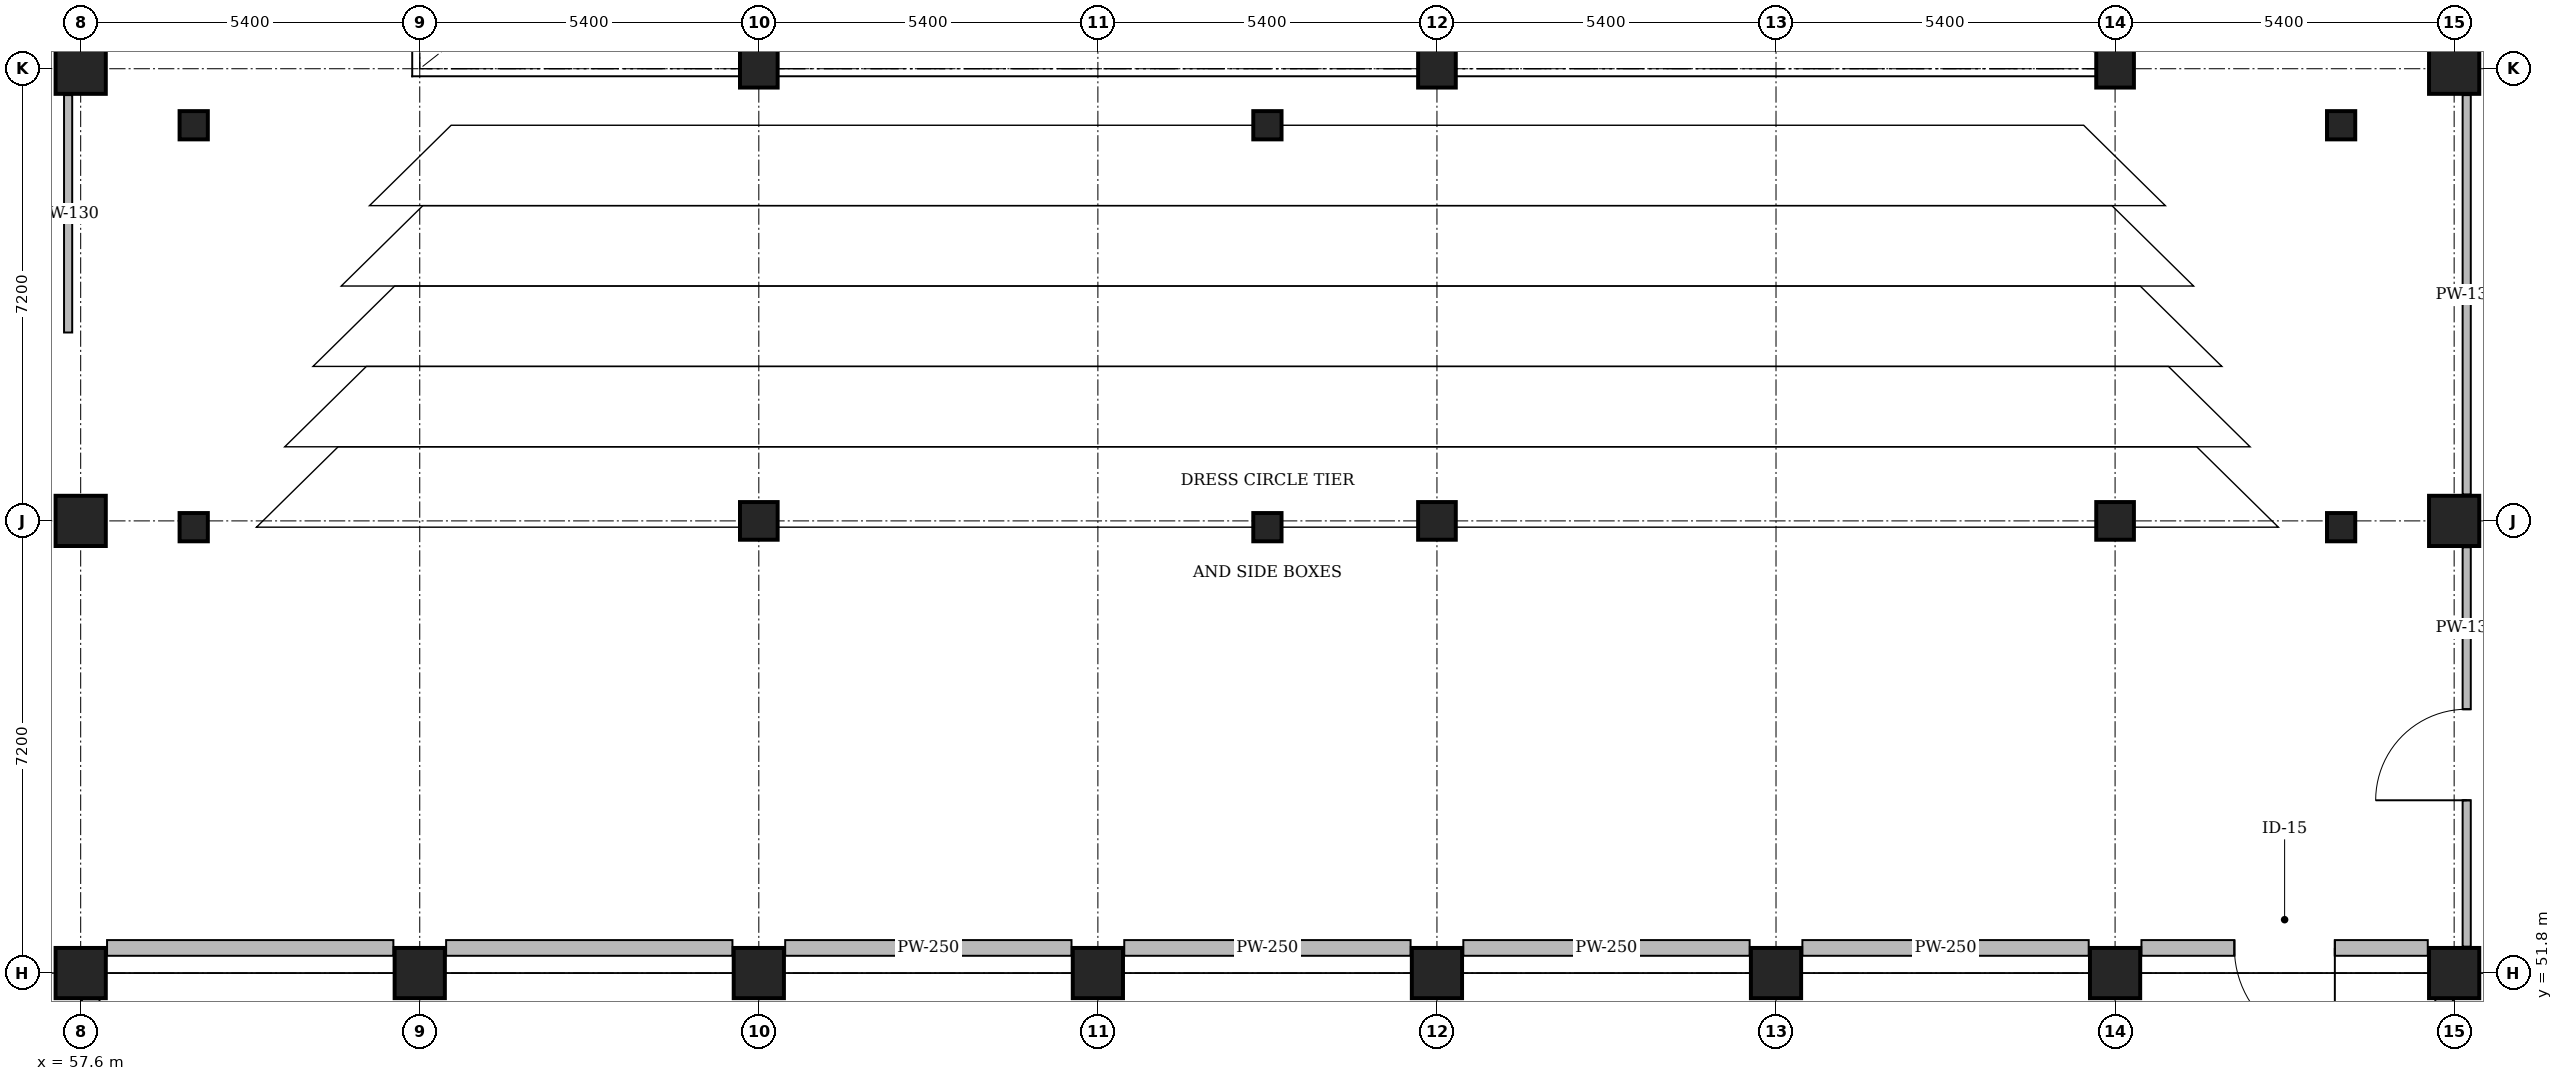
"""IFC4 building model, lengths in metres.
Left out: names, types, materials, properties, quantities, classifications, styles, units other than length and angle.
Written with IfcOpenShell. Run it as: python <this file> out.ifc"""

import sys

from ifc_helpers import new_model, si_unit, direction, frame, frame_2d, origin, origin_2d, place, context, subcontext, project, spatial, rectangle, extrude, element, fill, save


model = new_model("IFC4")
c1 = context("Model", 3, precision=1e-05, world=origin(), true_north=direction((0.0, 1.0)))
c2 = subcontext(c1, "Body", "Model", "MODEL_VIEW")
j1 = project(units=[si_unit("LENGTHUNIT", "METRE"), si_unit("PLANEANGLEUNIT", "RADIAN")], contexts=[c1])
p1 = place(None, origin())
s1 = spatial("IfcSite", under=j1, at=p1, CompositionType="ELEMENT")
p2 = place(p1, origin())
s2 = spatial("IfcBuilding", under=s1, at=p2, CompositionType="ELEMENT")
p3 = place(p2, frame((0.0, 0.0, 4.8)))
s3 = spatial("IfcBuildingStorey", under=s2, at=p3, CompositionType="ELEMENT", Elevation=4.8)
p4 = place(p3, frame((68.4, 51.8, 0.0), z_axis=(0.0, 0.0, 1.0), x_axis=(1.0, 0.0, 0.0)))
e1 = element("IfcColumn", 1, at=p4, inside=s3, PredefinedType="COLUMN", context=c2, shape_type="SweptSolid", body=[
    extrude(rectangle(XDim=0.8, YDim=0.8, at=origin_2d()), origin(), (0.0, 0.0, 1.0), 4.2),
])
for number, where, z_axis, x_axis in (
    (2, (68.4, 59.0, 0.0), (0.0, 0.0, 1.0), (1.0, 0.0, 0.0)),
    (3, (68.4, 66.2, 0.0), (0.0, 0.0, 1.0), (1.0, 0.0, 0.0)),
):
    element("IfcColumn", number, at=place(p3, frame(where, z_axis=z_axis, x_axis=x_axis)), inside=s3, PredefinedType="COLUMN", context=c2, shape_type="SweptSolid", body=[
        extrude(rectangle(XDim=0.6, YDim=0.6, at=origin_2d()), origin(), (0.0, 0.0, 1.0), 4.2),
    ])
for number, where, z_axis, x_axis in (
    (4, (73.8, 51.8, 0.0), (0.0, 0.0, 1.0), (1.0, 0.0, 0.0)),
    (5, (79.2, 51.8, 0.0), (0.0, 0.0, 1.0), (1.0, 0.0, 0.0)),
):
    element("IfcColumn", number, at=place(p3, frame(where, z_axis=z_axis, x_axis=x_axis)), inside=s3, PredefinedType="COLUMN", context=c2, shape_type="SweptSolid", body=[
        extrude(rectangle(XDim=0.8, YDim=0.8, at=origin_2d()), origin(), (0.0, 0.0, 1.0), 4.2),
    ])
for number, where, z_axis, x_axis in (
    (6, (79.2, 59.0, 0.0), (0.0, 0.0, 1.0), (1.0, 0.0, 0.0)),
    (7, (79.2, 66.2, 0.0), (0.0, 0.0, 1.0), (1.0, 0.0, 0.0)),
):
    element("IfcColumn", number, at=place(p3, frame(where, z_axis=z_axis, x_axis=x_axis)), inside=s3, PredefinedType="COLUMN", context=c2, shape_type="SweptSolid", body=[
        extrude(rectangle(XDim=0.6, YDim=0.6, at=origin_2d()), origin(), (0.0, 0.0, 1.0), 4.2),
    ])
for number, where, z_axis, x_axis in (
    (8, (84.6, 51.8, 0.0), (0.0, 0.0, 1.0), (1.0, 0.0, 0.0)),
    (9, (90.0, 51.8, 0.0), (0.0, 0.0, 1.0), (1.0, 0.0, 0.0)),
):
    element("IfcColumn", number, at=place(p3, frame(where, z_axis=z_axis, x_axis=x_axis)), inside=s3, PredefinedType="COLUMN", context=c2, shape_type="SweptSolid", body=[
        extrude(rectangle(XDim=0.8, YDim=0.8, at=origin_2d()), origin(), (0.0, 0.0, 1.0), 4.2),
    ])
for number, where, z_axis, x_axis in (
    (10, (90.0, 59.0, 0.0), (0.0, 0.0, 1.0), (1.0, 0.0, 0.0)),
    (11, (90.0, 66.2, 0.0), (0.0, 0.0, 1.0), (1.0, 0.0, 0.0)),
):
    element("IfcColumn", number, at=place(p3, frame(where, z_axis=z_axis, x_axis=x_axis)), inside=s3, PredefinedType="COLUMN", context=c2, shape_type="SweptSolid", body=[
        extrude(rectangle(XDim=0.6, YDim=0.6, at=origin_2d()), origin(), (0.0, 0.0, 1.0), 4.2),
    ])
for number, where, z_axis, x_axis in (
    (12, (95.4, 51.8, 0.0), (0.0, 0.0, 1.0), (1.0, 0.0, 0.0)),
    (13, (95.4, 59.0, 0.0), (0.0, 0.0, 1.0), (1.0, 0.0, 0.0)),
    (14, (95.4, 66.2, 0.0), (0.0, 0.0, 1.0), (1.0, 0.0, 0.0)),
    (15, (57.6, 51.8, 0.0), (0.0, 0.0, 1.0), (1.0, 0.0, 0.0)),
    (16, (57.6, 59.0, 0.0), (0.0, 0.0, 1.0), (1.0, 0.0, 0.0)),
    (17, (57.6, 66.2, 0.0), (0.0, 0.0, 1.0), (1.0, 0.0, 0.0)),
    (18, (63.0, 51.8, 0.0), (0.0, 0.0, 1.0), (1.0, 0.0, 0.0)),
):
    element("IfcColumn", number, at=place(p3, frame(where, z_axis=z_axis, x_axis=x_axis)), inside=s3, PredefinedType="COLUMN", context=c2, shape_type="SweptSolid", body=[
        extrude(rectangle(XDim=0.8, YDim=0.8, at=origin_2d()), origin(), (0.0, 0.0, 1.0), 4.2),
    ])
for number, where, z_axis, x_axis in (
    (19, (59.4, 58.9, 0.0), (0.0, 0.0, 1.0), (1.0, 0.0, 0.0)),
    (20, (76.5, 58.9, 0.0), (0.0, 0.0, 1.0), (1.0, 0.0, 0.0)),
    (21, (93.6, 58.9, 0.0), (0.0, 0.0, 1.0), (1.0, 0.0, 0.0)),
    (22, (59.4, 65.3, 0.0), (0.0, 0.0, 1.0), (1.0, 0.0, 0.0)),
    (23, (76.5, 65.3, 0.0), (0.0, 0.0, 1.0), (1.0, 0.0, 0.0)),
    (24, (93.6, 65.3, 0.0), (0.0, 0.0, 1.0), (1.0, 0.0, 0.0)),
):
    element("IfcColumn", number, at=place(p3, frame(where, z_axis=z_axis, x_axis=x_axis)), inside=s3, PredefinedType="COLUMN", context=c2, shape_type="SweptSolid", body=[
        extrude(rectangle(XDim=0.45, YDim=0.45, at=origin_2d()), origin(), (0.0, 0.0, 1.0), 4.2),
    ])
p5 = place(p3, frame((57.76, 49.9, 0.0), z_axis=(0.0, 0.0, 1.0), x_axis=(0.0, 1.0, 0.0)))
e25 = element("IfcWall", 25, at=p5, inside=s3, PredefinedType="SOLIDWALL", context=c2, shape_type="SweptSolid", body=[
    extrude(rectangle(XDim=1.95, YDim=0.28, at=frame_2d((0.975, 0.0))), origin(), (0.0, 0.0, 1.0), 2.723),
])
p6 = place(p3, frame((95.24, 49.9, 0.0), z_axis=(0.0, 0.0, 1.0), x_axis=(0.0, 1.0, 0.0)))
e26 = element("IfcWall", 26, at=p6, inside=s3, PredefinedType="SOLIDWALL", context=c2, shape_type="SweptSolid", body=[
    extrude(rectangle(XDim=1.95, YDim=0.28, at=frame_2d((0.975, 0.0))), origin(), (0.0, 0.0, 1.0), 3.373),
])
p7 = place(p3, frame((94.98, 52.2, 0.0), z_axis=(0.0, 0.0, 1.0), x_axis=(-1.0, 0.0, 0.0)))
e27 = element("IfcWall", 27, at=p7, inside=s3, PredefinedType="PARTITIONING", context=c2, shape_type="SweptSolid", body=[
    extrude(rectangle(XDim=4.56, YDim=0.25, at=frame_2d((2.28, 0.0))), origin(), (0.0, 0.0, 1.0), 3.26),
])
p8 = place(p7, frame((1.48, 0.0, 0.0)))
e28 = element("IfcOpeningElement", 28, at=p8, cuts=e27, PredefinedType="OPENING", context=c2, shape_type="SweptSolid", body=[
    extrude(rectangle(XDim=1.6, YDim=2.25, at=frame_2d((0.8, 1.125))), frame((0.0, 0.145, 0.0), z_axis=(0.0, -1.0, 0.0), x_axis=(1.0, 0.0, 0.0)), (0.0, 0.0, 1.0), 0.29),
])
p9 = place(p3, frame((89.58, 52.2, 0.0), z_axis=(0.0, 0.0, 1.0), x_axis=(-1.0, 0.0, 0.0)))
e29 = element("IfcWall", 29, at=p9, inside=s3, PredefinedType="PARTITIONING", context=c2, shape_type="SweptSolid", body=[
    extrude(rectangle(XDim=4.56, YDim=0.25, at=frame_2d((2.28, 0.0))), origin(), (0.0, 0.0, 1.0), 3.26),
])
p10 = place(p3, frame((84.18, 52.2, 0.0), z_axis=(0.0, 0.0, 1.0), x_axis=(-1.0, 0.0, 0.0)))
e30 = element("IfcWall", 30, at=p10, inside=s3, PredefinedType="PARTITIONING", context=c2, shape_type="SweptSolid", body=[
    extrude(rectangle(XDim=4.56, YDim=0.25, at=frame_2d((2.28, 0.0))), origin(), (0.0, 0.0, 1.0), 3.26),
])
p11 = place(p3, frame((78.78, 52.2, 0.0), z_axis=(0.0, 0.0, 1.0), x_axis=(-1.0, 0.0, 0.0)))
e31 = element("IfcWall", 31, at=p11, inside=s3, PredefinedType="PARTITIONING", context=c2, shape_type="SweptSolid", body=[
    extrude(rectangle(XDim=4.56, YDim=0.25, at=frame_2d((2.28, 0.0))), origin(), (0.0, 0.0, 1.0), 3.26),
])
p12 = place(p3, frame((73.38, 52.2, 0.0), z_axis=(0.0, 0.0, 1.0), x_axis=(-1.0, 0.0, 0.0)))
e32 = element("IfcWall", 32, at=p12, inside=s3, PredefinedType="PARTITIONING", context=c2, shape_type="SweptSolid", body=[
    extrude(rectangle(XDim=4.56, YDim=0.25, at=frame_2d((2.28, 0.0))), origin(), (0.0, 0.0, 1.0), 3.26),
])
for number, where, z_axis, x_axis in (
    (33, (67.98, 52.2, 0.0), (0.0, 0.0, 1.0), (-1.0, 0.0, 0.0)),
    (34, (62.58, 52.2, 0.0), (0.0, 0.0, 1.0), (-1.0, 0.0, 0.0)),
):
    element("IfcWall", number, at=place(p3, frame(where, z_axis=z_axis, x_axis=x_axis)), inside=s3, PredefinedType="PARTITIONING", context=c2, shape_type="SweptSolid", body=[
        extrude(rectangle(XDim=4.56, YDim=0.25, at=frame_2d((2.28, 0.0))), origin(), (0.0, 0.0, 1.0), 3.26),
    ])
p13 = place(p3, frame((57.4, 65.78, 0.0), z_axis=(0.0, 0.0, 1.0), x_axis=(0.0, -1.0, 0.0)))
e35 = element("IfcWall", 35, at=p13, inside=s3, PredefinedType="PARTITIONING", context=c2, shape_type="SweptSolid", body=[
    extrude(rectangle(XDim=3.78, YDim=0.13, at=frame_2d((1.89, 0.0))), origin(), (0.0, 0.0, 1.0), 3.55),
])
p14 = place(p3, frame((95.6, 52.22, 0.0), z_axis=(0.0, 0.0, 1.0), x_axis=(0.0, 1.0, 0.0)))
e36 = element("IfcWall", 36, at=p14, inside=s3, PredefinedType="PARTITIONING", context=c2, shape_type="SweptSolid", body=[
    extrude(rectangle(XDim=6.36, YDim=0.13, at=frame_2d((3.18, 0.0))), origin(), (0.0, 0.0, 1.0), 3.55),
])
p15 = place(p14, frame((2.331, 0.0, 0.0)))
e37 = element("IfcOpeningElement", 37, at=p15, cuts=e36, PredefinedType="OPENING", context=c2, shape_type="SweptSolid", body=[
    extrude(rectangle(XDim=1.45, YDim=2.2, at=frame_2d((0.725, 1.1))), frame((0.0, 0.085, 0.0), z_axis=(0.0, -1.0, 0.0), x_axis=(1.0, 0.0, 0.0)), (0.0, 0.0, 1.0), 0.17),
])
p16 = place(p3, frame((95.6, 59.42, 0.0), z_axis=(0.0, 0.0, 1.0), x_axis=(0.0, 1.0, 0.0)))
e38 = element("IfcWall", 38, at=p16, inside=s3, PredefinedType="PARTITIONING", context=c2, shape_type="SweptSolid", body=[
    extrude(rectangle(XDim=6.36, YDim=0.13, at=frame_2d((3.18, 0.0))), origin(), (0.0, 0.0, 1.0), 3.55),
])
p17 = place(p8, origin())
e39 = element("IfcDoor", 39, at=p17, inside=s3, OperationType="DOUBLE_DOOR_SINGLE_SWING", PredefinedType="DOOR", context=c2, shape_type="SweptSolid", body=[
    extrude(rectangle(XDim=1.6, YDim=2.25, at=frame_2d((0.8, 1.125))), frame((0.0, 0.025, 0.0), z_axis=(0.0, -1.0, 0.0), x_axis=(1.0, 0.0, 0.0)), (0.0, 0.0, 1.0), 0.05),
])
fill(e28, e39)
p18 = place(p15, origin())
e40 = element("IfcDoor", 40, at=p18, inside=s3, OperationType="DOUBLE_DOOR_SINGLE_SWING", PredefinedType="DOOR", context=c2, shape_type="SweptSolid", body=[
    extrude(rectangle(XDim=1.45, YDim=2.2, at=frame_2d((0.725, 1.1))), frame((0.0, 0.025, 0.0), z_axis=(0.0, -1.0, 0.0), x_axis=(1.0, 0.0, 0.0)), (0.0, 0.0, 1.0), 0.05),
])
fill(e37, e40)
save(model, sys.argv[1])
